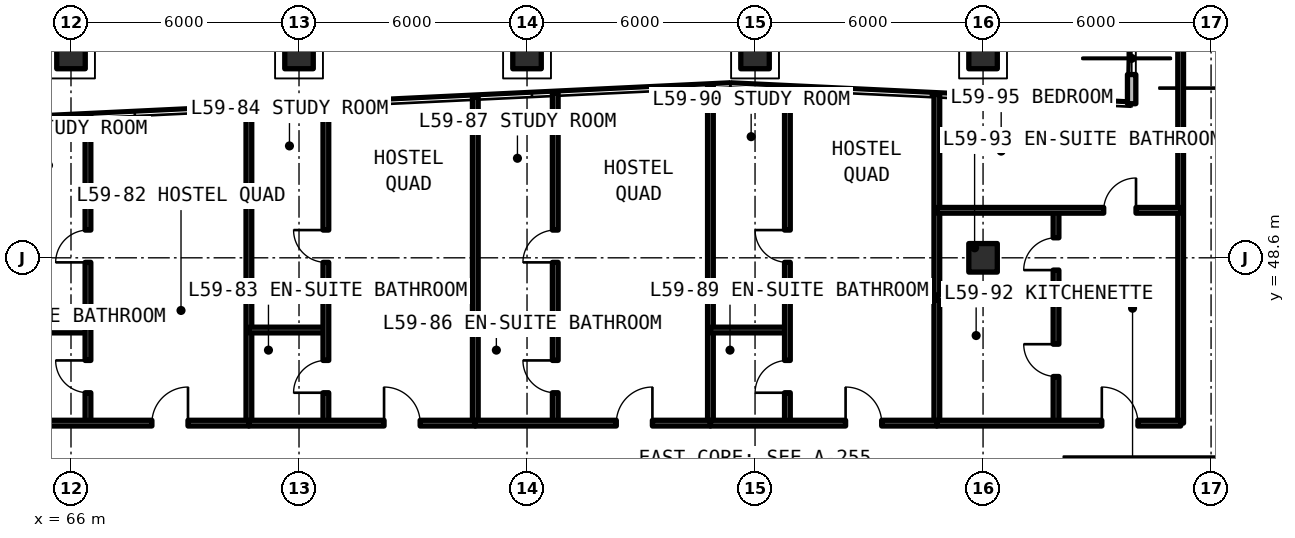
"""IFC4 building model, lengths in metres.
Left out: names, types, materials, properties, quantities, classifications, styles, units other than length and angle.
Written with IfcOpenShell. Run it as: python <this file> out.ifc"""

import sys

from ifc_helpers import new_model, si_unit, direction, frame, frame_2d, origin, origin_2d, place, context, subcontext, project, spatial, rectangle, extrude, element, fill, save


model = new_model("IFC4")
c1 = context("Model", 3, precision=1e-05, world=origin(), true_north=direction((0.0, 1.0)))
c2 = subcontext(c1, "Body", "Model", "MODEL_VIEW")
j1 = project(units=[si_unit("LENGTHUNIT", "METRE"), si_unit("PLANEANGLEUNIT", "RADIAN")], contexts=[c1])
p1 = place(None, origin())
s1 = spatial("IfcSite", under=j1, at=p1, CompositionType="ELEMENT")
p2 = place(p1, origin())
s2 = spatial("IfcBuilding", under=s1, at=p2, CompositionType="ELEMENT")
p3 = place(p2, frame((0.0, 0.0, 211.86)))
s3 = spatial("IfcBuildingStorey", under=s2, at=p3, CompositionType="ELEMENT", Elevation=211.86)
for number, where, z_axis, x_axis in (
    (1, (90.0, 48.6, 0.0), (0.0, 0.0, 1.0), (1.0, 0.0, 0.0)),
    (2, (66.0, 53.95, 0.0), (0.0, 0.0, 1.0), (1.0, 0.0, 0.0)),
    (3, (72.0, 53.95, 0.0), (0.0, 0.0, 1.0), (1.0, 0.0, 0.0)),
    (4, (78.0, 53.95, 0.0), (0.0, 0.0, 1.0), (1.0, 0.0, 0.0)),
    (5, (84.0, 53.95, 0.0), (0.0, 0.0, 1.0), (1.0, 0.0, 0.0)),
    (6, (90.0, 53.95, 0.0), (0.0, 0.0, 1.0), (1.0, 0.0, 0.0)),
):
    element("IfcColumn", number, at=place(p3, frame(where, z_axis=z_axis, x_axis=x_axis)), inside=s3, PredefinedType="COLUMN", context=c2, shape_type="SweptSolid", body=[
        extrude(rectangle(XDim=0.75, YDim=0.75, at=origin_2d()), origin(), (0.0, 0.0, 1.0), 3.63),
    ])
p4 = place(p3, frame((99.49, 50.904, 0.0), z_axis=(0.0, 0.0, 1.0), x_axis=(-0.707085909342, 0.707127652415, 0.0)))
e7 = element("IfcWall", 7, at=p4, inside=s3, PredefinedType="SOLIDWALL", context=c2, shape_type="SweptSolid", body=[
    extrude(rectangle(XDim=5.849, YDim=0.22, at=frame_2d((2.924, 0.0))), origin(), (0.0, 0.0, 1.0), 3.41),
])
p5 = place(p4, frame((1.224, 0.0, 0.78)))
e8 = element("IfcOpeningElement", 8, at=p5, cuts=e7, PredefinedType="OPENING", context=c2, shape_type="SweptSolid", body=[
    extrude(rectangle(XDim=3.4, YDim=1.66, at=frame_2d((1.7, 0.83))), frame((0.0, 0.12, 0.0), z_axis=(0.0, -1.0, 0.0), x_axis=(1.0, 0.0, 0.0)), (0.0, 0.0, 1.0), 0.24),
])
p6 = place(p3, frame((93.91, 55.04, 0.0), z_axis=(0.0, 0.0, 1.0), x_axis=(0.0, -1.0, 0.0)))
e9 = element("IfcWall", 9, at=p6, inside=s3, PredefinedType="SOLIDWALL", context=c2, shape_type="SweptSolid", body=[
    extrude(rectangle(XDim=2.385, YDim=0.22, at=frame_2d((1.193, 0.0))), origin(), (0.0, 0.0, 1.0), 3.41),
])
p7 = place(p6, frame((0.768, 0.0, 0.78)))
e10 = element("IfcOpeningElement", 10, at=p7, cuts=e9, PredefinedType="OPENING", context=c2, shape_type="SweptSolid", body=[
    extrude(rectangle(XDim=0.85, YDim=1.65, at=frame_2d((0.425, 0.825))), frame((0.0, 0.12, 0.0), z_axis=(0.0, -1.0, 0.0), x_axis=(1.0, 0.0, 0.0)), (0.0, 0.0, 1.0), 0.24),
])
p8 = place(p3, frame((95.2, 44.25, 0.0), z_axis=(0.0, 0.0, 1.0), x_axis=(0.0, 1.0, 0.0)))
e11 = element("IfcWall", 11, at=p8, inside=s3, PredefinedType="SOLIDWALL", context=c2, shape_type="SweptSolid", body=[
    extrude(rectangle(XDim=10.79, YDim=0.15, at=frame_2d((5.395, 0.0))), origin(), (0.0, 0.0, 1.0), 2.63),
])
p9 = place(p3, frame((70.681, 44.25, 0.0), z_axis=(0.0, 0.0, 1.0), x_axis=(0.0, 1.0, 0.0)))
e12 = element("IfcWall", 12, at=p9, inside=s3, PredefinedType="SOLIDWALL", context=c2, shape_type="SweptSolid", body=[
    extrude(rectangle(XDim=8.304, YDim=0.15, at=frame_2d((4.152, 0.0))), origin(), (0.0, 0.0, 1.0), 2.63),
])
p10 = place(p3, frame((64.265, 46.7, 0.0), z_axis=(0.0, 0.0, 1.0), x_axis=(1.0, 0.0, 0.0)))
e13 = element("IfcWall", 13, at=p10, inside=s3, PredefinedType="PARTITIONING", context=c2, shape_type="SweptSolid", body=[
    extrude(rectangle(XDim=2.181, YDim=0.15, at=frame_2d((1.091, 0.0))), origin(), (0.0, 0.0, 1.0), 2.63),
])
p11 = place(p3, frame((66.446, 44.25, 0.0), z_axis=(0.0, 0.0, 1.0), x_axis=(0.0, 1.0, 0.0)))
e14 = element("IfcWall", 14, at=p11, inside=s3, PredefinedType="PARTITIONING", context=c2, shape_type="SweptSolid", body=[
    extrude(rectangle(XDim=8.101, YDim=0.15, at=frame_2d((4.051, 0.0))), origin(), (0.0, 0.0, 1.0), 2.63),
])
p12 = place(p11, frame((0.8, 0.0, 0.0)))
e15 = element("IfcOpeningElement", 15, at=p12, cuts=e14, PredefinedType="OPENING", context=c2, shape_type="SweptSolid", body=[
    extrude(rectangle(XDim=0.85, YDim=2.1, at=frame_2d((0.425, 1.05))), frame((0.0, 0.085, 0.0), z_axis=(0.0, -1.0, 0.0), x_axis=(1.0, 0.0, 0.0)), (0.0, 0.0, 1.0), 0.17),
])
p13 = place(p11, frame((4.23, 0.0, 0.0)))
e16 = element("IfcOpeningElement", 16, at=p13, cuts=e14, PredefinedType="OPENING", context=c2, shape_type="SweptSolid", body=[
    extrude(rectangle(XDim=0.85, YDim=2.1, at=frame_2d((0.425, 1.05))), frame((0.0, 0.085, 0.0), z_axis=(0.0, -1.0, 0.0), x_axis=(1.0, 0.0, 0.0)), (0.0, 0.0, 1.0), 0.17),
])
p14 = place(p3, frame((64.265, 44.25, 0.0), z_axis=(0.0, 0.0, 1.0), x_axis=(1.0, 0.0, 0.0)))
e17 = element("IfcWall", 17, at=p14, inside=s3, PredefinedType="SOLIDWALL", context=c2, shape_type="SweptSolid", body=[
    extrude(rectangle(XDim=6.416, YDim=0.15, at=frame_2d((3.208, 0.0))), origin(), (0.0, 0.0, 1.0), 2.63),
])
p15 = place(p14, frame((3.864, 0.0, 0.0)))
e18 = element("IfcOpeningElement", 18, at=p15, cuts=e17, PredefinedType="OPENING", context=c2, shape_type="SweptSolid", body=[
    extrude(rectangle(XDim=0.95, YDim=2.15, at=frame_2d((0.475, 1.075))), frame((0.0, 0.085, 0.0), z_axis=(0.0, -1.0, 0.0), x_axis=(1.0, 0.0, 0.0)), (0.0, 0.0, 1.0), 0.17),
])
p16 = place(p3, frame((76.639, 44.25, 0.0), z_axis=(0.0, 0.0, 1.0), x_axis=(0.0, 1.0, 0.0)))
e19 = element("IfcWall", 19, at=p16, inside=s3, PredefinedType="SOLIDWALL", context=c2, shape_type="SweptSolid", body=[
    extrude(rectangle(XDim=8.589, YDim=0.15, at=frame_2d((4.294, 0.0))), origin(), (0.0, 0.0, 1.0), 2.63),
])
p17 = place(p3, frame((70.681, 46.7, 0.0), z_axis=(0.0, 0.0, 1.0), x_axis=(1.0, 0.0, 0.0)))
e20 = element("IfcWall", 20, at=p17, inside=s3, PredefinedType="PARTITIONING", context=c2, shape_type="SweptSolid", body=[
    extrude(rectangle(XDim=2.026, YDim=0.15, at=frame_2d((1.013, 0.0))), origin(), (0.0, 0.0, 1.0), 2.63),
])
p18 = place(p3, frame((72.707, 44.25, 0.0), z_axis=(0.0, 0.0, 1.0), x_axis=(0.0, 1.0, 0.0)))
e21 = element("IfcWall", 21, at=p18, inside=s3, PredefinedType="PARTITIONING", context=c2, shape_type="SweptSolid", body=[
    extrude(rectangle(XDim=8.401, YDim=0.15, at=frame_2d((4.2, 0.0))), origin(), (0.0, 0.0, 1.0), 2.63),
])
p19 = place(p18, frame((0.8, 0.0, 0.0)))
e22 = element("IfcOpeningElement", 22, at=p19, cuts=e21, PredefinedType="OPENING", context=c2, shape_type="SweptSolid", body=[
    extrude(rectangle(XDim=0.85, YDim=2.1, at=frame_2d((0.425, 1.05))), frame((0.0, 0.085, 0.0), z_axis=(0.0, -1.0, 0.0), x_axis=(1.0, 0.0, 0.0)), (0.0, 0.0, 1.0), 0.17),
])
p20 = place(p18, frame((4.23, 0.0, 0.0)))
e23 = element("IfcOpeningElement", 23, at=p20, cuts=e21, PredefinedType="OPENING", context=c2, shape_type="SweptSolid", body=[
    extrude(rectangle(XDim=0.85, YDim=2.1, at=frame_2d((0.425, 1.05))), frame((0.0, 0.085, 0.0), z_axis=(0.0, -1.0, 0.0), x_axis=(1.0, 0.0, 0.0)), (0.0, 0.0, 1.0), 0.17),
])
p21 = place(p3, frame((70.681, 44.25, 0.0), z_axis=(0.0, 0.0, 1.0), x_axis=(1.0, 0.0, 0.0)))
e24 = element("IfcWall", 24, at=p21, inside=s3, PredefinedType="SOLIDWALL", context=c2, shape_type="SweptSolid", body=[
    extrude(rectangle(XDim=5.958, YDim=0.15, at=frame_2d((2.979, 0.0))), origin(), (0.0, 0.0, 1.0), 2.63),
])
p22 = place(p21, frame((3.557, 0.0, 0.0)))
e25 = element("IfcOpeningElement", 25, at=p22, cuts=e24, PredefinedType="OPENING", context=c2, shape_type="SweptSolid", body=[
    extrude(rectangle(XDim=0.95, YDim=2.15, at=frame_2d((0.475, 1.075))), frame((0.0, 0.085, 0.0), z_axis=(0.0, -1.0, 0.0), x_axis=(1.0, 0.0, 0.0)), (0.0, 0.0, 1.0), 0.17),
])
p23 = place(p3, frame((82.826, 44.25, 0.0), z_axis=(0.0, 0.0, 1.0), x_axis=(0.0, 1.0, 0.0)))
e26 = element("IfcWall", 26, at=p23, inside=s3, PredefinedType="SOLIDWALL", context=c2, shape_type="SweptSolid", body=[
    extrude(rectangle(XDim=8.885, YDim=0.15, at=frame_2d((4.442, 0.0))), origin(), (0.0, 0.0, 1.0), 2.63),
])
p24 = place(p3, frame((76.639, 46.7, 0.0), z_axis=(0.0, 0.0, 1.0), x_axis=(1.0, 0.0, 0.0)))
e27 = element("IfcWall", 27, at=p24, inside=s3, PredefinedType="PARTITIONING", context=c2, shape_type="SweptSolid", body=[
    extrude(rectangle(XDim=2.104, YDim=0.15, at=frame_2d((1.052, 0.0))), origin(), (0.0, 0.0, 1.0), 2.63),
])
p25 = place(p3, frame((78.743, 44.25, 0.0), z_axis=(0.0, 0.0, 1.0), x_axis=(0.0, 1.0, 0.0)))
e28 = element("IfcWall", 28, at=p25, inside=s3, PredefinedType="PARTITIONING", context=c2, shape_type="SweptSolid", body=[
    extrude(rectangle(XDim=8.689, YDim=0.15, at=frame_2d((4.345, 0.0))), origin(), (0.0, 0.0, 1.0), 2.63),
])
p26 = place(p25, frame((0.8, 0.0, 0.0)))
e29 = element("IfcOpeningElement", 29, at=p26, cuts=e28, PredefinedType="OPENING", context=c2, shape_type="SweptSolid", body=[
    extrude(rectangle(XDim=0.85, YDim=2.1, at=frame_2d((0.425, 1.05))), frame((0.0, 0.085, 0.0), z_axis=(0.0, -1.0, 0.0), x_axis=(1.0, 0.0, 0.0)), (0.0, 0.0, 1.0), 0.17),
])
p27 = place(p25, frame((4.23, 0.0, 0.0)))
e30 = element("IfcOpeningElement", 30, at=p27, cuts=e28, PredefinedType="OPENING", context=c2, shape_type="SweptSolid", body=[
    extrude(rectangle(XDim=0.85, YDim=2.1, at=frame_2d((0.425, 1.05))), frame((0.0, 0.085, 0.0), z_axis=(0.0, -1.0, 0.0), x_axis=(1.0, 0.0, 0.0)), (0.0, 0.0, 1.0), 0.17),
])
p28 = place(p3, frame((76.639, 44.25, 0.0), z_axis=(0.0, 0.0, 1.0), x_axis=(1.0, 0.0, 0.0)))
e31 = element("IfcWall", 31, at=p28, inside=s3, PredefinedType="SOLIDWALL", context=c2, shape_type="SweptSolid", body=[
    extrude(rectangle(XDim=6.187, YDim=0.15, at=frame_2d((3.094, 0.0))), origin(), (0.0, 0.0, 1.0), 2.63),
])
p29 = place(p28, frame((3.71, 0.0, 0.0)))
e32 = element("IfcOpeningElement", 32, at=p29, cuts=e31, PredefinedType="OPENING", context=c2, shape_type="SweptSolid", body=[
    extrude(rectangle(XDim=0.95, YDim=2.15, at=frame_2d((0.475, 1.075))), frame((0.0, 0.085, 0.0), z_axis=(0.0, -1.0, 0.0), x_axis=(1.0, 0.0, 0.0)), (0.0, 0.0, 1.0), 0.17),
])
p30 = place(p3, frame((88.784, 44.25, 0.0), z_axis=(0.0, 0.0, 1.0), x_axis=(0.0, 1.0, 0.0)))
e33 = element("IfcWall", 33, at=p30, inside=s3, PredefinedType="SOLIDWALL", context=c2, shape_type="SweptSolid", body=[
    extrude(rectangle(XDim=8.65, YDim=0.15, at=frame_2d((4.325, 0.0))), origin(), (0.0, 0.0, 1.0), 2.63),
])
p31 = place(p3, frame((82.826, 46.7, 0.0), z_axis=(0.0, 0.0, 1.0), x_axis=(1.0, 0.0, 0.0)))
e34 = element("IfcWall", 34, at=p31, inside=s3, PredefinedType="PARTITIONING", context=c2, shape_type="SweptSolid", body=[
    extrude(rectangle(XDim=2.026, YDim=0.15, at=frame_2d((1.013, 0.0))), origin(), (0.0, 0.0, 1.0), 2.63),
])
p32 = place(p3, frame((84.852, 44.25, 0.0), z_axis=(0.0, 0.0, 1.0), x_axis=(0.0, 1.0, 0.0)))
e35 = element("IfcWall", 35, at=p32, inside=s3, PredefinedType="PARTITIONING", context=c2, shape_type="SweptSolid", body=[
    extrude(rectangle(XDim=8.838, YDim=0.15, at=frame_2d((4.419, 0.0))), origin(), (0.0, 0.0, 1.0), 2.63),
])
p33 = place(p32, frame((0.8, 0.0, 0.0)))
e36 = element("IfcOpeningElement", 36, at=p33, cuts=e35, PredefinedType="OPENING", context=c2, shape_type="SweptSolid", body=[
    extrude(rectangle(XDim=0.85, YDim=2.1, at=frame_2d((0.425, 1.05))), frame((0.0, 0.085, 0.0), z_axis=(0.0, -1.0, 0.0), x_axis=(1.0, 0.0, 0.0)), (0.0, 0.0, 1.0), 0.17),
])
p34 = place(p32, frame((4.23, 0.0, 0.0)))
e37 = element("IfcOpeningElement", 37, at=p34, cuts=e35, PredefinedType="OPENING", context=c2, shape_type="SweptSolid", body=[
    extrude(rectangle(XDim=0.85, YDim=2.1, at=frame_2d((0.425, 1.05))), frame((0.0, 0.085, 0.0), z_axis=(0.0, -1.0, 0.0), x_axis=(1.0, 0.0, 0.0)), (0.0, 0.0, 1.0), 0.17),
])
p35 = place(p3, frame((82.826, 44.25, 0.0), z_axis=(0.0, 0.0, 1.0), x_axis=(1.0, 0.0, 0.0)))
e38 = element("IfcWall", 38, at=p35, inside=s3, PredefinedType="SOLIDWALL", context=c2, shape_type="SweptSolid", body=[
    extrude(rectangle(XDim=5.958, YDim=0.15, at=frame_2d((2.979, 0.0))), origin(), (0.0, 0.0, 1.0), 2.63),
])
p36 = place(p35, frame((3.557, 0.0, 0.0)))
e39 = element("IfcOpeningElement", 39, at=p36, cuts=e38, PredefinedType="OPENING", context=c2, shape_type="SweptSolid", body=[
    extrude(rectangle(XDim=0.95, YDim=2.15, at=frame_2d((0.475, 1.075))), frame((0.0, 0.085, 0.0), z_axis=(0.0, -1.0, 0.0), x_axis=(1.0, 0.0, 0.0)), (0.0, 0.0, 1.0), 0.17),
])
p37 = place(p3, frame((88.784, 47.554, 0.0), z_axis=(0.0, 0.0, 1.0), x_axis=(1.0, 0.0, 0.0)))
e40 = element("IfcWall", 40, at=p37, inside=s3, PredefinedType="PARTITIONING", context=c2, shape_type="SweptSolid", body=[
    extrude(rectangle(XDim=3.136, YDim=0.15, at=frame_2d((1.568, 0.0))), origin(), (0.0, 0.0, 1.0), 2.63),
])
p38 = place(p3, frame((91.92, 44.25, 0.0), z_axis=(0.0, 0.0, 1.0), x_axis=(0.0, 1.0, 0.0)))
e41 = element("IfcWall", 41, at=p38, inside=s3, PredefinedType="PARTITIONING", context=c2, shape_type="SweptSolid", body=[
    extrude(rectangle(XDim=5.6, YDim=0.15, at=frame_2d((2.8, 0.0))), origin(), (0.0, 0.0, 1.0), 2.63),
])
p39 = place(p38, frame((1.227, 0.0, 0.0)))
e42 = element("IfcOpeningElement", 42, at=p39, cuts=e41, PredefinedType="OPENING", context=c2, shape_type="SweptSolid", body=[
    extrude(rectangle(XDim=0.85, YDim=2.1, at=frame_2d((0.425, 1.05))), frame((0.0, 0.085, 0.0), z_axis=(0.0, -1.0, 0.0), x_axis=(1.0, 0.0, 0.0)), (0.0, 0.0, 1.0), 0.17),
])
p40 = place(p38, frame((4.027, 0.0, 0.0)))
e43 = element("IfcOpeningElement", 43, at=p40, cuts=e41, PredefinedType="OPENING", context=c2, shape_type="SweptSolid", body=[
    extrude(rectangle(XDim=0.85, YDim=2.1, at=frame_2d((0.425, 1.05))), frame((0.0, 0.085, 0.0), z_axis=(0.0, -1.0, 0.0), x_axis=(1.0, 0.0, 0.0)), (0.0, 0.0, 1.0), 0.17),
])
p41 = place(p3, frame((88.784, 49.85, 0.0), z_axis=(0.0, 0.0, 1.0), x_axis=(1.0, 0.0, 0.0)))
e44 = element("IfcWall", 44, at=p41, inside=s3, PredefinedType="PARTITIONING", context=c2, shape_type="SweptSolid", body=[
    extrude(rectangle(XDim=6.416, YDim=0.15, at=frame_2d((3.208, 0.0))), origin(), (0.0, 0.0, 1.0), 2.63),
])
p42 = place(p41, frame((4.391, 0.0, 0.0)))
e45 = element("IfcOpeningElement", 45, at=p42, cuts=e44, PredefinedType="OPENING", context=c2, shape_type="SweptSolid", body=[
    extrude(rectangle(XDim=0.85, YDim=2.1, at=frame_2d((0.425, 1.05))), frame((0.0, 0.085, 0.0), z_axis=(0.0, -1.0, 0.0), x_axis=(1.0, 0.0, 0.0)), (0.0, 0.0, 1.0), 0.17),
])
p43 = place(p3, frame((88.784, 44.25, 0.0), z_axis=(0.0, 0.0, 1.0), x_axis=(1.0, 0.0, 0.0)))
e46 = element("IfcWall", 46, at=p43, inside=s3, PredefinedType="SOLIDWALL", context=c2, shape_type="SweptSolid", body=[
    extrude(rectangle(XDim=6.416, YDim=0.15, at=frame_2d((3.208, 0.0))), origin(), (0.0, 0.0, 1.0), 2.63),
])
p44 = place(p43, frame((4.341, 0.0, 0.0)))
e47 = element("IfcOpeningElement", 47, at=p44, cuts=e46, PredefinedType="OPENING", context=c2, shape_type="SweptSolid", body=[
    extrude(rectangle(XDim=0.95, YDim=2.15, at=frame_2d((0.475, 1.075))), frame((0.0, 0.085, 0.0), z_axis=(0.0, -1.0, 0.0), x_axis=(1.0, 0.0, 0.0)), (0.0, 0.0, 1.0), 0.17),
])
p45 = place(p7, origin())
e48 = element("IfcWindow", 48, at=p45, inside=s3, PartitioningType="SINGLE_PANEL", PredefinedType="WINDOW", context=c2, shape_type="SweptSolid", body=[
    extrude(rectangle(XDim=0.85, YDim=1.65, at=frame_2d((0.425, 0.825))), frame((0.0, 0.03, 0.0), z_axis=(0.0, -1.0, 0.0), x_axis=(1.0, 0.0, 0.0)), (0.0, 0.0, 1.0), 0.06),
])
fill(e10, e48)
p46 = place(p12, origin())
e49 = element("IfcDoor", 49, at=p46, inside=s3, OperationType="SINGLE_SWING_RIGHT", PredefinedType="DOOR", context=c2, shape_type="SweptSolid", body=[
    extrude(rectangle(XDim=0.85, YDim=2.1, at=frame_2d((0.425, 1.05))), frame((0.0, 0.025, 0.0), z_axis=(0.0, -1.0, 0.0), x_axis=(1.0, 0.0, 0.0)), (0.0, 0.0, 1.0), 0.05),
])
fill(e15, e49)
p47 = place(p13, origin())
e50 = element("IfcDoor", 50, at=p47, inside=s3, OperationType="SINGLE_SWING_LEFT", PredefinedType="DOOR", context=c2, shape_type="SweptSolid", body=[
    extrude(rectangle(XDim=0.85, YDim=2.1, at=frame_2d((0.425, 1.05))), frame((0.0, 0.025, 0.0), z_axis=(0.0, -1.0, 0.0), x_axis=(1.0, 0.0, 0.0)), (0.0, 0.0, 1.0), 0.05),
])
fill(e16, e50)
p48 = place(p15, origin())
e51 = element("IfcDoor", 51, at=p48, inside=s3, OperationType="SINGLE_SWING_RIGHT", PredefinedType="DOOR", context=c2, shape_type="SweptSolid", body=[
    extrude(rectangle(XDim=0.95, YDim=2.15, at=frame_2d((0.475, 1.075))), frame((0.0, 0.025, 0.0), z_axis=(0.0, -1.0, 0.0), x_axis=(1.0, 0.0, 0.0)), (0.0, 0.0, 1.0), 0.05),
])
fill(e18, e51)
p49 = place(p19, origin())
e52 = element("IfcDoor", 52, at=p49, inside=s3, OperationType="SINGLE_SWING_LEFT", PredefinedType="DOOR", context=c2, shape_type="SweptSolid", body=[
    extrude(rectangle(XDim=0.85, YDim=2.1, at=frame_2d((0.425, 1.05))), frame((0.0, 0.025, 0.0), z_axis=(0.0, -1.0, 0.0), x_axis=(1.0, 0.0, 0.0)), (0.0, 0.0, 1.0), 0.05),
])
fill(e22, e52)
p50 = place(p20, origin())
e53 = element("IfcDoor", 53, at=p50, inside=s3, OperationType="SINGLE_SWING_RIGHT", PredefinedType="DOOR", context=c2, shape_type="SweptSolid", body=[
    extrude(rectangle(XDim=0.85, YDim=2.1, at=frame_2d((0.425, 1.05))), frame((0.0, 0.025, 0.0), z_axis=(0.0, -1.0, 0.0), x_axis=(1.0, 0.0, 0.0)), (0.0, 0.0, 1.0), 0.05),
])
fill(e23, e53)
p51 = place(p22, origin())
e54 = element("IfcDoor", 54, at=p51, inside=s3, OperationType="SINGLE_SWING_LEFT", PredefinedType="DOOR", context=c2, shape_type="SweptSolid", body=[
    extrude(rectangle(XDim=0.95, YDim=2.15, at=frame_2d((0.475, 1.075))), frame((0.0, 0.025, 0.0), z_axis=(0.0, -1.0, 0.0), x_axis=(1.0, 0.0, 0.0)), (0.0, 0.0, 1.0), 0.05),
])
fill(e25, e54)
p52 = place(p26, origin())
e55 = element("IfcDoor", 55, at=p52, inside=s3, OperationType="SINGLE_SWING_RIGHT", PredefinedType="DOOR", context=c2, shape_type="SweptSolid", body=[
    extrude(rectangle(XDim=0.85, YDim=2.1, at=frame_2d((0.425, 1.05))), frame((0.0, 0.025, 0.0), z_axis=(0.0, -1.0, 0.0), x_axis=(1.0, 0.0, 0.0)), (0.0, 0.0, 1.0), 0.05),
])
fill(e29, e55)
p53 = place(p27, origin())
e56 = element("IfcDoor", 56, at=p53, inside=s3, OperationType="SINGLE_SWING_LEFT", PredefinedType="DOOR", context=c2, shape_type="SweptSolid", body=[
    extrude(rectangle(XDim=0.85, YDim=2.1, at=frame_2d((0.425, 1.05))), frame((0.0, 0.025, 0.0), z_axis=(0.0, -1.0, 0.0), x_axis=(1.0, 0.0, 0.0)), (0.0, 0.0, 1.0), 0.05),
])
fill(e30, e56)
p54 = place(p29, origin())
e57 = element("IfcDoor", 57, at=p54, inside=s3, OperationType="SINGLE_SWING_RIGHT", PredefinedType="DOOR", context=c2, shape_type="SweptSolid", body=[
    extrude(rectangle(XDim=0.95, YDim=2.15, at=frame_2d((0.475, 1.075))), frame((0.0, 0.025, 0.0), z_axis=(0.0, -1.0, 0.0), x_axis=(1.0, 0.0, 0.0)), (0.0, 0.0, 1.0), 0.05),
])
fill(e32, e57)
p55 = place(p33, origin())
e58 = element("IfcDoor", 58, at=p55, inside=s3, OperationType="SINGLE_SWING_LEFT", PredefinedType="DOOR", context=c2, shape_type="SweptSolid", body=[
    extrude(rectangle(XDim=0.85, YDim=2.1, at=frame_2d((0.425, 1.05))), frame((0.0, 0.025, 0.0), z_axis=(0.0, -1.0, 0.0), x_axis=(1.0, 0.0, 0.0)), (0.0, 0.0, 1.0), 0.05),
])
fill(e36, e58)
p56 = place(p34, origin())
e59 = element("IfcDoor", 59, at=p56, inside=s3, OperationType="SINGLE_SWING_RIGHT", PredefinedType="DOOR", context=c2, shape_type="SweptSolid", body=[
    extrude(rectangle(XDim=0.85, YDim=2.1, at=frame_2d((0.425, 1.05))), frame((0.0, 0.025, 0.0), z_axis=(0.0, -1.0, 0.0), x_axis=(1.0, 0.0, 0.0)), (0.0, 0.0, 1.0), 0.05),
])
fill(e37, e59)
p57 = place(p36, origin())
e60 = element("IfcDoor", 60, at=p57, inside=s3, OperationType="SINGLE_SWING_LEFT", PredefinedType="DOOR", context=c2, shape_type="SweptSolid", body=[
    extrude(rectangle(XDim=0.95, YDim=2.15, at=frame_2d((0.475, 1.075))), frame((0.0, 0.025, 0.0), z_axis=(0.0, -1.0, 0.0), x_axis=(1.0, 0.0, 0.0)), (0.0, 0.0, 1.0), 0.05),
])
fill(e39, e60)
p58 = place(p39, origin())
e61 = element("IfcDoor", 61, at=p58, inside=s3, OperationType="SINGLE_SWING_RIGHT", PredefinedType="DOOR", context=c2, shape_type="SweptSolid", body=[
    extrude(rectangle(XDim=0.85, YDim=2.1, at=frame_2d((0.425, 1.05))), frame((0.0, 0.025, 0.0), z_axis=(0.0, -1.0, 0.0), x_axis=(1.0, 0.0, 0.0)), (0.0, 0.0, 1.0), 0.05),
])
fill(e42, e61)
p59 = place(p40, origin())
e62 = element("IfcDoor", 62, at=p59, inside=s3, OperationType="SINGLE_SWING_LEFT", PredefinedType="DOOR", context=c2, shape_type="SweptSolid", body=[
    extrude(rectangle(XDim=0.85, YDim=2.1, at=frame_2d((0.425, 1.05))), frame((0.0, 0.025, 0.0), z_axis=(0.0, -1.0, 0.0), x_axis=(1.0, 0.0, 0.0)), (0.0, 0.0, 1.0), 0.05),
])
fill(e43, e62)
p60 = place(p42, origin())
e63 = element("IfcDoor", 63, at=p60, inside=s3, OperationType="SINGLE_SWING_RIGHT", PredefinedType="DOOR", context=c2, shape_type="SweptSolid", body=[
    extrude(rectangle(XDim=0.85, YDim=2.1, at=frame_2d((0.425, 1.05))), frame((0.0, 0.025, 0.0), z_axis=(0.0, -1.0, 0.0), x_axis=(1.0, 0.0, 0.0)), (0.0, 0.0, 1.0), 0.05),
])
fill(e45, e63)
p61 = place(p44, origin())
e64 = element("IfcDoor", 64, at=p61, inside=s3, OperationType="SINGLE_SWING_LEFT", PredefinedType="DOOR", context=c2, shape_type="SweptSolid", body=[
    extrude(rectangle(XDim=0.95, YDim=2.15, at=frame_2d((0.475, 1.075))), frame((0.0, 0.025, 0.0), z_axis=(0.0, -1.0, 0.0), x_axis=(1.0, 0.0, 0.0)), (0.0, 0.0, 1.0), 0.05),
])
fill(e47, e64)
save(model, sys.argv[1])
